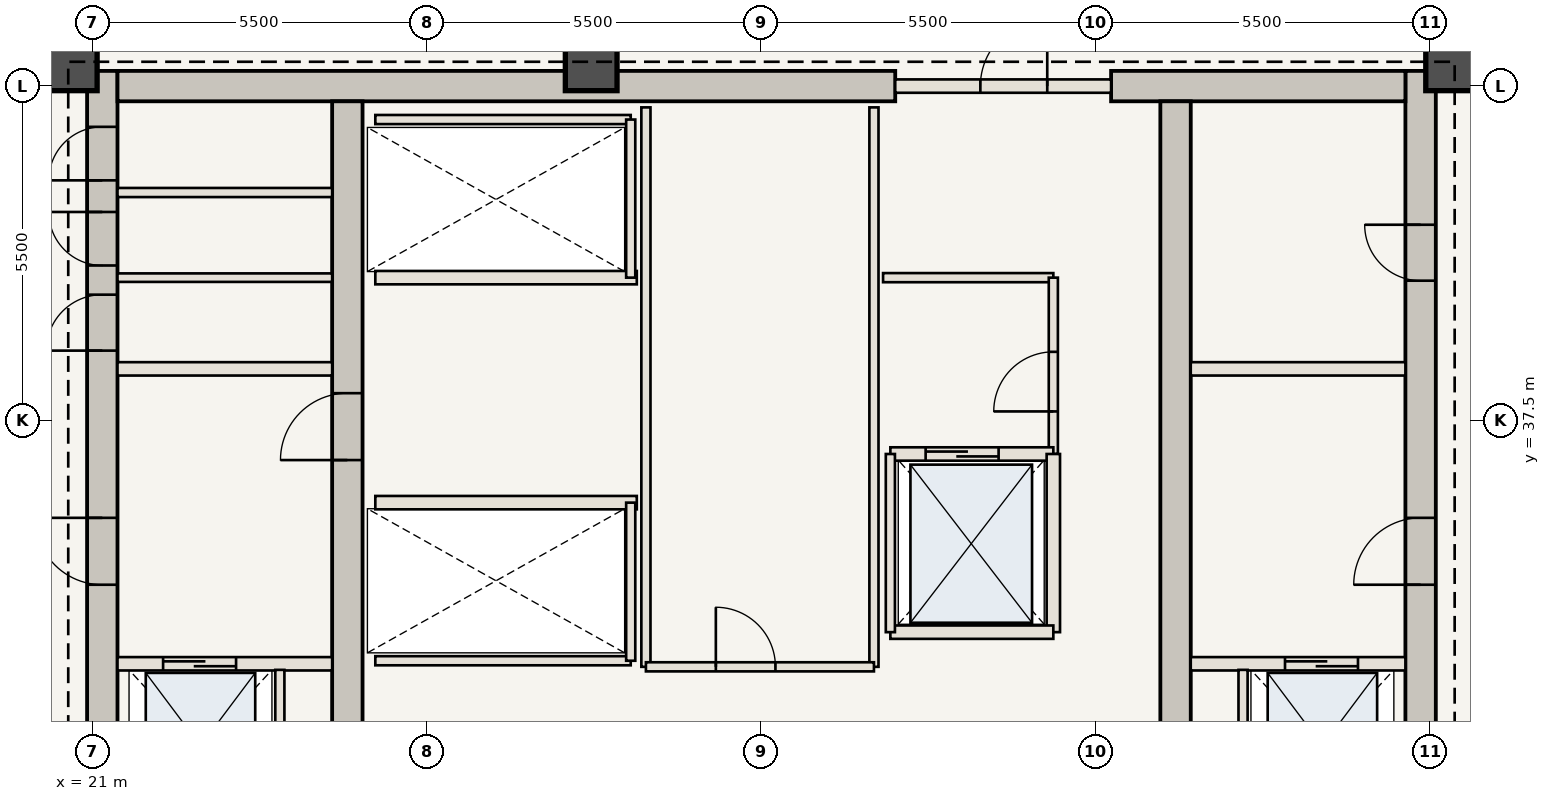
"""IFC4 building model, lengths in metres.
Left out: names, types, materials, properties, quantities, classifications, styles, units other than length and angle.
Written with IfcOpenShell. Run it as: python <this file> out.ifc"""

import sys

from ifc_helpers import new_model, si_unit, direction, frame, frame_2d, origin, origin_2d, place, context, subcontext, project, spatial, rectangle, extrude, element, fill, save


model = new_model("IFC4")
c1 = context("Model", 3, precision=1e-05, world=origin(), true_north=direction((0.0, 1.0)))
c2 = subcontext(c1, "Body", "Model", "MODEL_VIEW")
j1 = project(units=[si_unit("LENGTHUNIT", "METRE"), si_unit("PLANEANGLEUNIT", "RADIAN")], contexts=[c1])
p1 = place(None, origin())
s1 = spatial("IfcSite", under=j1, at=p1, CompositionType="ELEMENT")
p2 = place(p1, origin())
s2 = spatial("IfcBuilding", under=s1, at=p2, CompositionType="ELEMENT")
p3 = place(p2, frame((0.0, 0.0, 198.45)))
s3 = spatial("IfcBuildingStorey", under=s2, at=p3, CompositionType="ELEMENT", Elevation=198.45)
p4 = place(p3, frame((21.16, 30.6, 0.0), z_axis=(0.0, 0.0, 1.0), x_axis=(0.0, 1.0, 0.0)))
e1 = element("IfcWall", 1, at=p4, inside=s3, PredefinedType="SHEAR", context=c2, shape_type="SweptSolid", body=[
    extrude(rectangle(XDim=12.65, YDim=0.5, at=frame_2d((6.325, 0.0))), origin(), (0.0, 0.0, 1.0), 3.85),
])
p5 = place(p4, frame((4.2, 0.0, 0.0)))
e2 = element("IfcOpeningElement", 2, at=p5, cuts=e1, PredefinedType="OPENING", context=c2, shape_type="SweptSolid", body=[
    extrude(rectangle(XDim=1.1, YDim=2.15, at=frame_2d((0.55, 1.075))), frame((0.0, 0.26, 0.0), z_axis=(0.0, -1.0, 0.0), x_axis=(1.0, 0.0, 0.0)), (0.0, 0.0, 1.0), 0.52),
])
p6 = place(p4, frame((8.05, 0.0, 0.0)))
e3 = element("IfcOpeningElement", 3, at=p6, cuts=e1, PredefinedType="OPENING", context=c2, shape_type="SweptSolid", body=[
    extrude(rectangle(XDim=0.92, YDim=2.1, at=frame_2d((0.46, 1.05))), frame((0.0, 0.26, 0.0), z_axis=(0.0, -1.0, 0.0), x_axis=(1.0, 0.0, 0.0)), (0.0, 0.0, 1.0), 0.52),
])
p7 = place(p4, frame((9.45, 0.0, 0.0)))
e4 = element("IfcOpeningElement", 4, at=p7, cuts=e1, PredefinedType="OPENING", context=c2, shape_type="SweptSolid", body=[
    extrude(rectangle(XDim=0.88, YDim=2.1, at=frame_2d((0.44, 1.05))), frame((0.0, 0.26, 0.0), z_axis=(0.0, -1.0, 0.0), x_axis=(1.0, 0.0, 0.0)), (0.0, 0.0, 1.0), 0.52),
])
p8 = place(p4, frame((10.85, 0.0, 0.0)))
e5 = element("IfcOpeningElement", 5, at=p8, cuts=e1, PredefinedType="OPENING", context=c2, shape_type="SweptSolid", body=[
    extrude(rectangle(XDim=0.88, YDim=2.1, at=frame_2d((0.44, 1.05))), frame((0.0, 0.26, 0.0), z_axis=(0.0, -1.0, 0.0), x_axis=(1.0, 0.0, 0.0)), (0.0, 0.0, 1.0), 0.52),
])
p9 = place(p3, frame((42.84, 30.6, 0.0), z_axis=(0.0, 0.0, 1.0), x_axis=(0.0, 1.0, 0.0)))
e6 = element("IfcWall", 6, at=p9, inside=s3, PredefinedType="SHEAR", context=c2, shape_type="SweptSolid", body=[
    extrude(rectangle(XDim=12.65, YDim=0.5, at=frame_2d((6.325, 0.0))), origin(), (0.0, 0.0, 1.0), 3.85),
])
p10 = place(p9, frame((4.2, 0.0, 0.0)))
e7 = element("IfcOpeningElement", 7, at=p10, cuts=e6, PredefinedType="OPENING", context=c2, shape_type="SweptSolid", body=[
    extrude(rectangle(XDim=1.1, YDim=2.15, at=frame_2d((0.55, 1.075))), frame((0.0, 0.26, 0.0), z_axis=(0.0, -1.0, 0.0), x_axis=(1.0, 0.0, 0.0)), (0.0, 0.0, 1.0), 0.52),
])
p11 = place(p9, frame((9.2, 0.0, 0.0)))
e8 = element("IfcOpeningElement", 8, at=p11, cuts=e6, PredefinedType="OPENING", context=c2, shape_type="SweptSolid", body=[
    extrude(rectangle(XDim=0.92, YDim=2.1, at=frame_2d((0.46, 1.05))), frame((0.0, 0.26, 0.0), z_axis=(0.0, -1.0, 0.0), x_axis=(1.0, 0.0, 0.0)), (0.0, 0.0, 1.0), 0.52),
])
p12 = place(p3, frame((21.41, 43.0, 0.0), z_axis=(0.0, 0.0, 1.0), x_axis=(1.0, 0.0, 0.0)))
e9 = element("IfcWall", 9, at=p12, inside=s3, PredefinedType="SHEAR", context=c2, shape_type="SweptSolid", body=[
    extrude(rectangle(XDim=12.79, YDim=0.5, at=frame_2d((6.395, 0.0))), origin(), (0.0, 0.0, 1.0), 3.85),
])
p13 = place(p3, frame((37.75, 43.0, 0.0), z_axis=(0.0, 0.0, 1.0), x_axis=(1.0, 0.0, 0.0)))
e10 = element("IfcWall", 10, at=p13, inside=s3, PredefinedType="SHEAR", context=c2, shape_type="SweptSolid", body=[
    extrude(rectangle(XDim=4.84, YDim=0.5, at=frame_2d((2.42, 0.0))), origin(), (0.0, 0.0, 1.0), 3.85),
])
p14 = place(p3, frame((25.19, 30.6, 0.0), z_axis=(0.0, 0.0, 1.0), x_axis=(0.0, 1.0, 0.0)))
e11 = element("IfcWall", 11, at=p14, inside=s3, PredefinedType="SHEAR", context=c2, shape_type="SweptSolid", body=[
    extrude(rectangle(XDim=12.15, YDim=0.5, at=frame_2d((6.075, 0.0))), origin(), (0.0, 0.0, 1.0), 3.85),
])
p15 = place(p14, frame((6.25, 0.0, 0.0)))
e12 = element("IfcOpeningElement", 12, at=p15, cuts=e11, PredefinedType="OPENING", context=c2, shape_type="SweptSolid", body=[
    extrude(rectangle(XDim=1.1, YDim=2.15, at=frame_2d((0.55, 1.075))), frame((0.0, 0.26, 0.0), z_axis=(0.0, -1.0, 0.0), x_axis=(1.0, 0.0, 0.0)), (0.0, 0.0, 1.0), 0.52),
])
p16 = place(p3, frame((38.81, 30.6, 0.0), z_axis=(0.0, 0.0, 1.0), x_axis=(0.0, 1.0, 0.0)))
e13 = element("IfcWall", 13, at=p16, inside=s3, PredefinedType="SHEAR", context=c2, shape_type="SweptSolid", body=[
    extrude(rectangle(XDim=12.15, YDim=0.5, at=frame_2d((6.075, 0.0))), origin(), (0.0, 0.0, 1.0), 3.85),
])
for number, where, z_axis, x_axis in (
    (14, (43.35, 43.35, 0.0), (0.0, 0.0, 1.0), (1.0, 0.0, 0.0)),
    (15, (29.2, 43.35, 0.0), (0.0, 0.0, 1.0), (1.0, 0.0, 0.0)),
    (16, (20.65, 43.35, 0.0), (0.0, 0.0, 1.0), (1.0, 0.0, 0.0)),
):
    element("IfcColumn", number, at=place(p3, frame(where, z_axis=z_axis, x_axis=x_axis)), inside=s3, PredefinedType="COLUMN", context=c2, shape_type="SweptSolid", body=[
        extrude(rectangle(XDim=0.85, YDim=0.85, at=origin_2d()), origin(), (0.0, 0.0, 1.0), 3.85),
    ])
p17 = place(p3, frame((21.41, 33.5, 0.0), z_axis=(0.0, 0.0, 1.0), x_axis=(1.0, 0.0, 0.0)))
e17 = element("IfcWall", 17, at=p17, inside=s3, PredefinedType="STANDARD", context=c2, shape_type="SweptSolid", body=[
    extrude(rectangle(XDim=3.53, YDim=0.22, at=frame_2d((1.765, 0.0))), origin(), (0.0, 0.0, 1.0), 3.685),
])
p18 = place(p17, frame((0.75, 0.0, 0.0)))
e18 = element("IfcOpeningElement", 18, at=p18, cuts=e17, PredefinedType="OPENING", context=c2, shape_type="SweptSolid", body=[
    extrude(rectangle(XDim=1.2, YDim=2.2, at=frame_2d((0.6, 1.1))), frame((0.0, 0.12, 0.0), z_axis=(0.0, -1.0, 0.0), x_axis=(1.0, 0.0, 0.0)), (0.0, 0.0, 1.0), 0.24),
])
p19 = place(p3, frame((24.08, 30.75, 0.0), z_axis=(0.0, 0.0, 1.0), x_axis=(0.0, 1.0, 0.0)))
e19 = element("IfcWall", 19, at=p19, inside=s3, PredefinedType="STANDARD", context=c2, shape_type="SweptSolid", body=[
    extrude(rectangle(XDim=2.65, YDim=0.15, at=frame_2d((1.325, 0.0))), origin(), (0.0, 0.0, 1.0), 3.685),
])
p20 = place(p3, frame((39.06, 33.5, 0.0), z_axis=(0.0, 0.0, 1.0), x_axis=(1.0, 0.0, 0.0)))
e20 = element("IfcWall", 20, at=p20, inside=s3, PredefinedType="STANDARD", context=c2, shape_type="SweptSolid", body=[
    extrude(rectangle(XDim=3.53, YDim=0.22, at=frame_2d((1.765, 0.0))), origin(), (0.0, 0.0, 1.0), 3.685),
])
p21 = place(p20, frame((1.55, 0.0, 0.0)))
e21 = element("IfcOpeningElement", 21, at=p21, cuts=e20, PredefinedType="OPENING", context=c2, shape_type="SweptSolid", body=[
    extrude(rectangle(XDim=1.2, YDim=2.2, at=frame_2d((0.6, 1.1))), frame((0.0, 0.12, 0.0), z_axis=(0.0, -1.0, 0.0), x_axis=(1.0, 0.0, 0.0)), (0.0, 0.0, 1.0), 0.24),
])
p22 = place(p3, frame((39.92, 30.75, 0.0), z_axis=(0.0, 0.0, 1.0), x_axis=(0.0, 1.0, 0.0)))
e22 = element("IfcWall", 22, at=p22, inside=s3, PredefinedType="STANDARD", context=c2, shape_type="SweptSolid", body=[
    extrude(rectangle(XDim=2.65, YDim=0.15, at=frame_2d((1.325, 0.0))), origin(), (0.0, 0.0, 1.0), 3.685),
])
for number, where, z_axis, x_axis in (
    (23, (21.41, 38.35, 0.0), (0.0, 0.0, 1.0), (1.0, 0.0, 0.0)),
    (24, (39.06, 38.35, 0.0), (0.0, 0.0, 1.0), (1.0, 0.0, 0.0)),
):
    element("IfcWall", number, at=place(p3, frame(where, z_axis=z_axis, x_axis=x_axis)), inside=s3, PredefinedType="STANDARD", context=c2, shape_type="SweptSolid", body=[
        extrude(rectangle(XDim=3.53, YDim=0.22, at=frame_2d((1.765, 0.0))), origin(), (0.0, 0.0, 1.0), 3.685),
    ])
p23 = place(p3, frame((21.41, 39.85, 0.0), z_axis=(0.0, 0.0, 1.0), x_axis=(1.0, 0.0, 0.0)))
e25 = element("IfcWall", 25, at=p23, inside=s3, PredefinedType="STANDARD", context=c2, shape_type="SweptSolid", body=[
    extrude(rectangle(XDim=3.53, YDim=0.14, at=frame_2d((1.765, 0.0))), origin(), (0.0, 0.0, 1.0), 3.685),
])
p24 = place(p3, frame((21.41, 41.25, 0.0), z_axis=(0.0, 0.0, 1.0), x_axis=(1.0, 0.0, 0.0)))
e26 = element("IfcWall", 26, at=p24, inside=s3, PredefinedType="STANDARD", context=c2, shape_type="SweptSolid", body=[
    extrude(rectangle(XDim=3.53, YDim=0.15, at=frame_2d((1.765, 0.0))), origin(), (0.0, 0.0, 1.0), 3.685),
])
p25 = place(p3, frame((34.0, 39.85, 0.0), z_axis=(0.0, 0.0, 1.0), x_axis=(1.0, 0.0, 0.0)))
e27 = element("IfcWall", 27, at=p25, inside=s3, PredefinedType="STANDARD", context=c2, shape_type="SweptSolid", body=[
    extrude(rectangle(XDim=2.8, YDim=0.15, at=frame_2d((1.4, 0.0))), origin(), (0.0, 0.0, 1.0), 3.685),
])
p26 = place(p3, frame((36.8, 36.95, 0.0), z_axis=(0.0, 0.0, 1.0), x_axis=(0.0, 1.0, 0.0)))
e28 = element("IfcWall", 28, at=p26, inside=s3, PredefinedType="STANDARD", context=c2, shape_type="SweptSolid", body=[
    extrude(rectangle(XDim=2.9, YDim=0.15, at=frame_2d((1.45, 0.0))), origin(), (0.0, 0.0, 1.0), 3.685),
])
p27 = place(p26, frame((0.7, 0.0, 0.0)))
e29 = element("IfcOpeningElement", 29, at=p27, cuts=e28, PredefinedType="OPENING", context=c2, shape_type="SweptSolid", body=[
    extrude(rectangle(XDim=0.98, YDim=2.2, at=frame_2d((0.49, 1.1))), frame((0.0, 0.085, 0.0), z_axis=(0.0, -1.0, 0.0), x_axis=(1.0, 0.0, 0.0)), (0.0, 0.0, 1.0), 0.17),
])
p28 = place(p3, frame((25.65, 36.15, 0.0), z_axis=(0.0, 0.0, 1.0), x_axis=(1.0, 0.0, 0.0)))
e30 = element("IfcWall", 30, at=p28, inside=s3, PredefinedType="STANDARD", context=c2, shape_type="SweptSolid", body=[
    extrude(rectangle(XDim=4.3, YDim=0.22, at=frame_2d((2.15, 0.0))), origin(), (0.0, 0.0, 1.0), 3.685),
])
p29 = place(p3, frame((25.65, 33.55, 0.0), z_axis=(0.0, 0.0, 1.0), x_axis=(1.0, 0.0, 0.0)))
e31 = element("IfcWall", 31, at=p29, inside=s3, PredefinedType="STANDARD", context=c2, shape_type="SweptSolid", body=[
    extrude(rectangle(XDim=4.2, YDim=0.15, at=frame_2d((2.1, 0.0))), origin(), (0.0, 0.0, 1.0), 3.685),
])
p30 = place(p3, frame((29.85, 33.55, 0.0), z_axis=(0.0, 0.0, 1.0), x_axis=(0.0, 1.0, 0.0)))
e32 = element("IfcWall", 32, at=p30, inside=s3, PredefinedType="STANDARD", context=c2, shape_type="SweptSolid", body=[
    extrude(rectangle(XDim=2.6, YDim=0.15, at=frame_2d((1.3, 0.0))), origin(), (0.0, 0.0, 1.0), 3.685),
])
p31 = place(p3, frame((25.65, 39.85, 0.0), z_axis=(0.0, 0.0, 1.0), x_axis=(1.0, 0.0, 0.0)))
e33 = element("IfcWall", 33, at=p31, inside=s3, PredefinedType="STANDARD", context=c2, shape_type="SweptSolid", body=[
    extrude(rectangle(XDim=4.3, YDim=0.22, at=frame_2d((2.15, 0.0))), origin(), (0.0, 0.0, 1.0), 3.685),
])
p32 = place(p3, frame((25.65, 42.45, 0.0), z_axis=(0.0, 0.0, 1.0), x_axis=(1.0, 0.0, 0.0)))
e34 = element("IfcWall", 34, at=p32, inside=s3, PredefinedType="STANDARD", context=c2, shape_type="SweptSolid", body=[
    extrude(rectangle(XDim=4.2, YDim=0.15, at=frame_2d((2.1, 0.0))), origin(), (0.0, 0.0, 1.0), 3.685),
])
p33 = place(p3, frame((29.85, 39.85, 0.0), z_axis=(0.0, 0.0, 1.0), x_axis=(0.0, 1.0, 0.0)))
e35 = element("IfcWall", 35, at=p33, inside=s3, PredefinedType="STANDARD", context=c2, shape_type="SweptSolid", body=[
    extrude(rectangle(XDim=2.6, YDim=0.15, at=frame_2d((1.3, 0.0))), origin(), (0.0, 0.0, 1.0), 3.685),
])
for number, where, z_axis, x_axis in (
    (36, (30.1, 33.45, 0.0), (0.0, 0.0, 1.0), (0.0, 1.0, 0.0)),
    (37, (33.85, 33.45, 0.0), (0.0, 0.0, 1.0), (0.0, 1.0, 0.0)),
):
    element("IfcWall", number, at=place(p3, frame(where, z_axis=z_axis, x_axis=x_axis)), inside=s3, PredefinedType="STANDARD", context=c2, shape_type="SweptSolid", body=[
        extrude(rectangle(XDim=9.2, YDim=0.15, at=frame_2d((4.6, 0.0))), origin(), (0.0, 0.0, 1.0), 3.685),
    ])
p34 = place(p3, frame((30.1, 33.45, 0.0), z_axis=(0.0, 0.0, 1.0), x_axis=(1.0, 0.0, 0.0)))
e38 = element("IfcWall", 38, at=p34, inside=s3, PredefinedType="STANDARD", context=c2, shape_type="SweptSolid", body=[
    extrude(rectangle(XDim=3.75, YDim=0.15, at=frame_2d((1.875, 0.0))), origin(), (0.0, 0.0, 1.0), 3.685),
])
p35 = place(p34, frame((1.15, 0.0, 0.0)))
e39 = element("IfcOpeningElement", 39, at=p35, cuts=e38, PredefinedType="OPENING", context=c2, shape_type="SweptSolid", body=[
    extrude(rectangle(XDim=0.98, YDim=2.2, at=frame_2d((0.49, 1.1))), frame((0.0, 0.085, 0.0), z_axis=(0.0, -1.0, 0.0), x_axis=(1.0, 0.0, 0.0)), (0.0, 0.0, 1.0), 0.17),
])
p36 = place(p3, frame((34.2, 43.0, 0.0), z_axis=(0.0, 0.0, 1.0), x_axis=(1.0, 0.0, 0.0)))
e40 = element("IfcWall", 40, at=p36, inside=s3, PredefinedType="STANDARD", context=c2, shape_type="SweptSolid", body=[
    extrude(rectangle(XDim=3.55, YDim=0.22, at=frame_2d((1.775, 0.0))), origin(), (0.0, 0.0, 1.0), 3.685),
])
p37 = place(p36, frame((1.4, 0.0, 0.0)))
e41 = element("IfcOpeningElement", 41, at=p37, cuts=e40, PredefinedType="OPENING", context=c2, shape_type="SweptSolid", body=[
    extrude(rectangle(XDim=1.1, YDim=2.15, at=frame_2d((0.55, 1.075))), frame((0.0, 0.12, 0.0), z_axis=(0.0, -1.0, 0.0), x_axis=(1.0, 0.0, 0.0)), (0.0, 0.0, 1.0), 0.24),
])
p38 = place(p3, frame((34.12, 36.95, 0.0), z_axis=(0.0, 0.0, 1.0), x_axis=(1.0, 0.0, 0.0)))
e42 = element("IfcWall", 42, at=p38, inside=s3, PredefinedType="STANDARD", context=c2, shape_type="SweptSolid", body=[
    extrude(rectangle(XDim=2.68, YDim=0.22, at=frame_2d((1.34, 0.0))), origin(), (0.0, 0.0, 1.0), 3.685),
])
p39 = place(p38, frame((0.58, 0.0, 0.0)))
e43 = element("IfcOpeningElement", 43, at=p39, cuts=e42, PredefinedType="OPENING", context=c2, shape_type="SweptSolid", body=[
    extrude(rectangle(XDim=1.2, YDim=2.2, at=frame_2d((0.6, 1.1))), frame((0.0, 0.12, 0.0), z_axis=(0.0, -1.0, 0.0), x_axis=(1.0, 0.0, 0.0)), (0.0, 0.0, 1.0), 0.24),
])
p40 = place(p3, frame((36.8, 34.02, 0.0), z_axis=(0.0, 0.0, 1.0), x_axis=(0.0, 1.0, 0.0)))
e44 = element("IfcWall", 44, at=p40, inside=s3, PredefinedType="STANDARD", context=c2, shape_type="SweptSolid", body=[
    extrude(rectangle(XDim=2.93, YDim=0.22, at=frame_2d((1.465, 0.0))), origin(), (0.0, 0.0, 1.0), 3.685),
])
p41 = place(p3, frame((34.12, 34.02, 0.0), z_axis=(0.0, 0.0, 1.0), x_axis=(1.0, 0.0, 0.0)))
e45 = element("IfcWall", 45, at=p41, inside=s3, PredefinedType="STANDARD", context=c2, shape_type="SweptSolid", body=[
    extrude(rectangle(XDim=2.68, YDim=0.22, at=frame_2d((1.34, 0.0))), origin(), (0.0, 0.0, 1.0), 3.685),
])
p42 = place(p3, frame((34.12, 34.02, 0.0), z_axis=(0.0, 0.0, 1.0), x_axis=(0.0, 1.0, 0.0)))
e46 = element("IfcWall", 46, at=p42, inside=s3, PredefinedType="STANDARD", context=c2, shape_type="SweptSolid", body=[
    extrude(rectangle(XDim=2.93, YDim=0.15, at=frame_2d((1.465, 0.0))), origin(), (0.0, 0.0, 1.0), 3.685),
])
p43 = place(p5, origin())
e47 = element("IfcDoor", 47, at=p43, inside=s3, OperationType="SINGLE_SWING_RIGHT", PredefinedType="DOOR", context=c2, shape_type="SweptSolid", body=[
    extrude(rectangle(XDim=1.1, YDim=2.15, at=frame_2d((0.55, 1.075))), frame((0.0, 0.025, 0.0), z_axis=(0.0, -1.0, 0.0), x_axis=(1.0, 0.0, 0.0)), (0.0, 0.0, 1.0), 0.05),
])
fill(e2, e47)
p44 = place(p10, origin())
e48 = element("IfcDoor", 48, at=p44, inside=s3, OperationType="SINGLE_SWING_LEFT", PredefinedType="DOOR", context=c2, shape_type="SweptSolid", body=[
    extrude(rectangle(XDim=1.1, YDim=2.15, at=frame_2d((0.55, 1.075))), frame((0.0, 0.025, 0.0), z_axis=(0.0, -1.0, 0.0), x_axis=(1.0, 0.0, 0.0)), (0.0, 0.0, 1.0), 0.05),
])
fill(e7, e48)
p45 = place(p15, origin())
e49 = element("IfcDoor", 49, at=p45, inside=s3, OperationType="SINGLE_SWING_LEFT", PredefinedType="DOOR", context=c2, shape_type="SweptSolid", body=[
    extrude(rectangle(XDim=1.1, YDim=2.15, at=frame_2d((0.55, 1.075))), frame((0.0, 0.025, 0.0), z_axis=(0.0, -1.0, 0.0), x_axis=(1.0, 0.0, 0.0)), (0.0, 0.0, 1.0), 0.05),
])
fill(e12, e49)
p46 = place(p6, origin())
e50 = element("IfcDoor", 50, at=p46, inside=s3, OperationType="SINGLE_SWING_LEFT", PredefinedType="DOOR", context=c2, shape_type="SweptSolid", body=[
    extrude(rectangle(XDim=0.92, YDim=2.1, at=frame_2d((0.46, 1.05))), frame((0.0, 0.025, 0.0), z_axis=(0.0, -1.0, 0.0), x_axis=(1.0, 0.0, 0.0)), (0.0, 0.0, 1.0), 0.05),
])
fill(e3, e50)
p47 = place(p7, origin())
e51 = element("IfcDoor", 51, at=p47, inside=s3, OperationType="SINGLE_SWING_RIGHT", PredefinedType="DOOR", context=c2, shape_type="SweptSolid", body=[
    extrude(rectangle(XDim=0.88, YDim=2.1, at=frame_2d((0.44, 1.05))), frame((0.0, 0.025, 0.0), z_axis=(0.0, -1.0, 0.0), x_axis=(1.0, 0.0, 0.0)), (0.0, 0.0, 1.0), 0.05),
])
fill(e4, e51)
p48 = place(p8, origin())
e52 = element("IfcDoor", 52, at=p48, inside=s3, OperationType="SINGLE_SWING_LEFT", PredefinedType="DOOR", context=c2, shape_type="SweptSolid", body=[
    extrude(rectangle(XDim=0.88, YDim=2.1, at=frame_2d((0.44, 1.05))), frame((0.0, 0.025, 0.0), z_axis=(0.0, -1.0, 0.0), x_axis=(1.0, 0.0, 0.0)), (0.0, 0.0, 1.0), 0.05),
])
fill(e5, e52)
p49 = place(p11, origin())
e53 = element("IfcDoor", 53, at=p49, inside=s3, OperationType="SINGLE_SWING_RIGHT", PredefinedType="DOOR", context=c2, shape_type="SweptSolid", body=[
    extrude(rectangle(XDim=0.92, YDim=2.1, at=frame_2d((0.46, 1.05))), frame((0.0, 0.025, 0.0), z_axis=(0.0, -1.0, 0.0), x_axis=(1.0, 0.0, 0.0)), (0.0, 0.0, 1.0), 0.05),
])
fill(e8, e53)
p50 = place(p18, origin())
e54 = element("IfcDoor", 54, at=p50, inside=s3, OperationType="DOUBLE_DOOR_SLIDING", PredefinedType="DOOR", context=c2, shape_type="SweptSolid", body=[
    extrude(rectangle(XDim=1.2, YDim=2.2, at=frame_2d((0.6, 1.1))), frame((0.0, 0.025, 0.0), z_axis=(0.0, -1.0, 0.0), x_axis=(1.0, 0.0, 0.0)), (0.0, 0.0, 1.0), 0.05),
])
fill(e18, e54)
p51 = place(p21, origin())
e55 = element("IfcDoor", 55, at=p51, inside=s3, OperationType="DOUBLE_DOOR_SLIDING", PredefinedType="DOOR", context=c2, shape_type="SweptSolid", body=[
    extrude(rectangle(XDim=1.2, YDim=2.2, at=frame_2d((0.6, 1.1))), frame((0.0, 0.025, 0.0), z_axis=(0.0, -1.0, 0.0), x_axis=(1.0, 0.0, 0.0)), (0.0, 0.0, 1.0), 0.05),
])
fill(e21, e55)
p52 = place(p27, origin())
e56 = element("IfcDoor", 56, at=p52, inside=s3, OperationType="SINGLE_SWING_LEFT", PredefinedType="DOOR", context=c2, shape_type="SweptSolid", body=[
    extrude(rectangle(XDim=0.98, YDim=2.2, at=frame_2d((0.49, 1.1))), frame((0.0, 0.025, 0.0), z_axis=(0.0, -1.0, 0.0), x_axis=(1.0, 0.0, 0.0)), (0.0, 0.0, 1.0), 0.05),
])
fill(e29, e56)
p53 = place(p35, origin())
e57 = element("IfcDoor", 57, at=p53, inside=s3, OperationType="SINGLE_SWING_LEFT", PredefinedType="DOOR", context=c2, shape_type="SweptSolid", body=[
    extrude(rectangle(XDim=0.98, YDim=2.2, at=frame_2d((0.49, 1.1))), frame((0.0, 0.025, 0.0), z_axis=(0.0, -1.0, 0.0), x_axis=(1.0, 0.0, 0.0)), (0.0, 0.0, 1.0), 0.05),
])
fill(e39, e57)
p54 = place(p37, origin())
e58 = element("IfcDoor", 58, at=p54, inside=s3, OperationType="SINGLE_SWING_RIGHT", PredefinedType="DOOR", context=c2, shape_type="SweptSolid", body=[
    extrude(rectangle(XDim=1.1, YDim=2.15, at=frame_2d((0.55, 1.075))), frame((0.0, 0.025, 0.0), z_axis=(0.0, -1.0, 0.0), x_axis=(1.0, 0.0, 0.0)), (0.0, 0.0, 1.0), 0.05),
])
fill(e41, e58)
p55 = place(p39, origin())
e59 = element("IfcDoor", 59, at=p55, inside=s3, OperationType="DOUBLE_DOOR_SLIDING", PredefinedType="DOOR", context=c2, shape_type="SweptSolid", body=[
    extrude(rectangle(XDim=1.2, YDim=2.2, at=frame_2d((0.6, 1.1))), frame((0.0, 0.025, 0.0), z_axis=(0.0, -1.0, 0.0), x_axis=(1.0, 0.0, 0.0)), (0.0, 0.0, 1.0), 0.05),
])
fill(e43, e59)
save(model, sys.argv[1])
